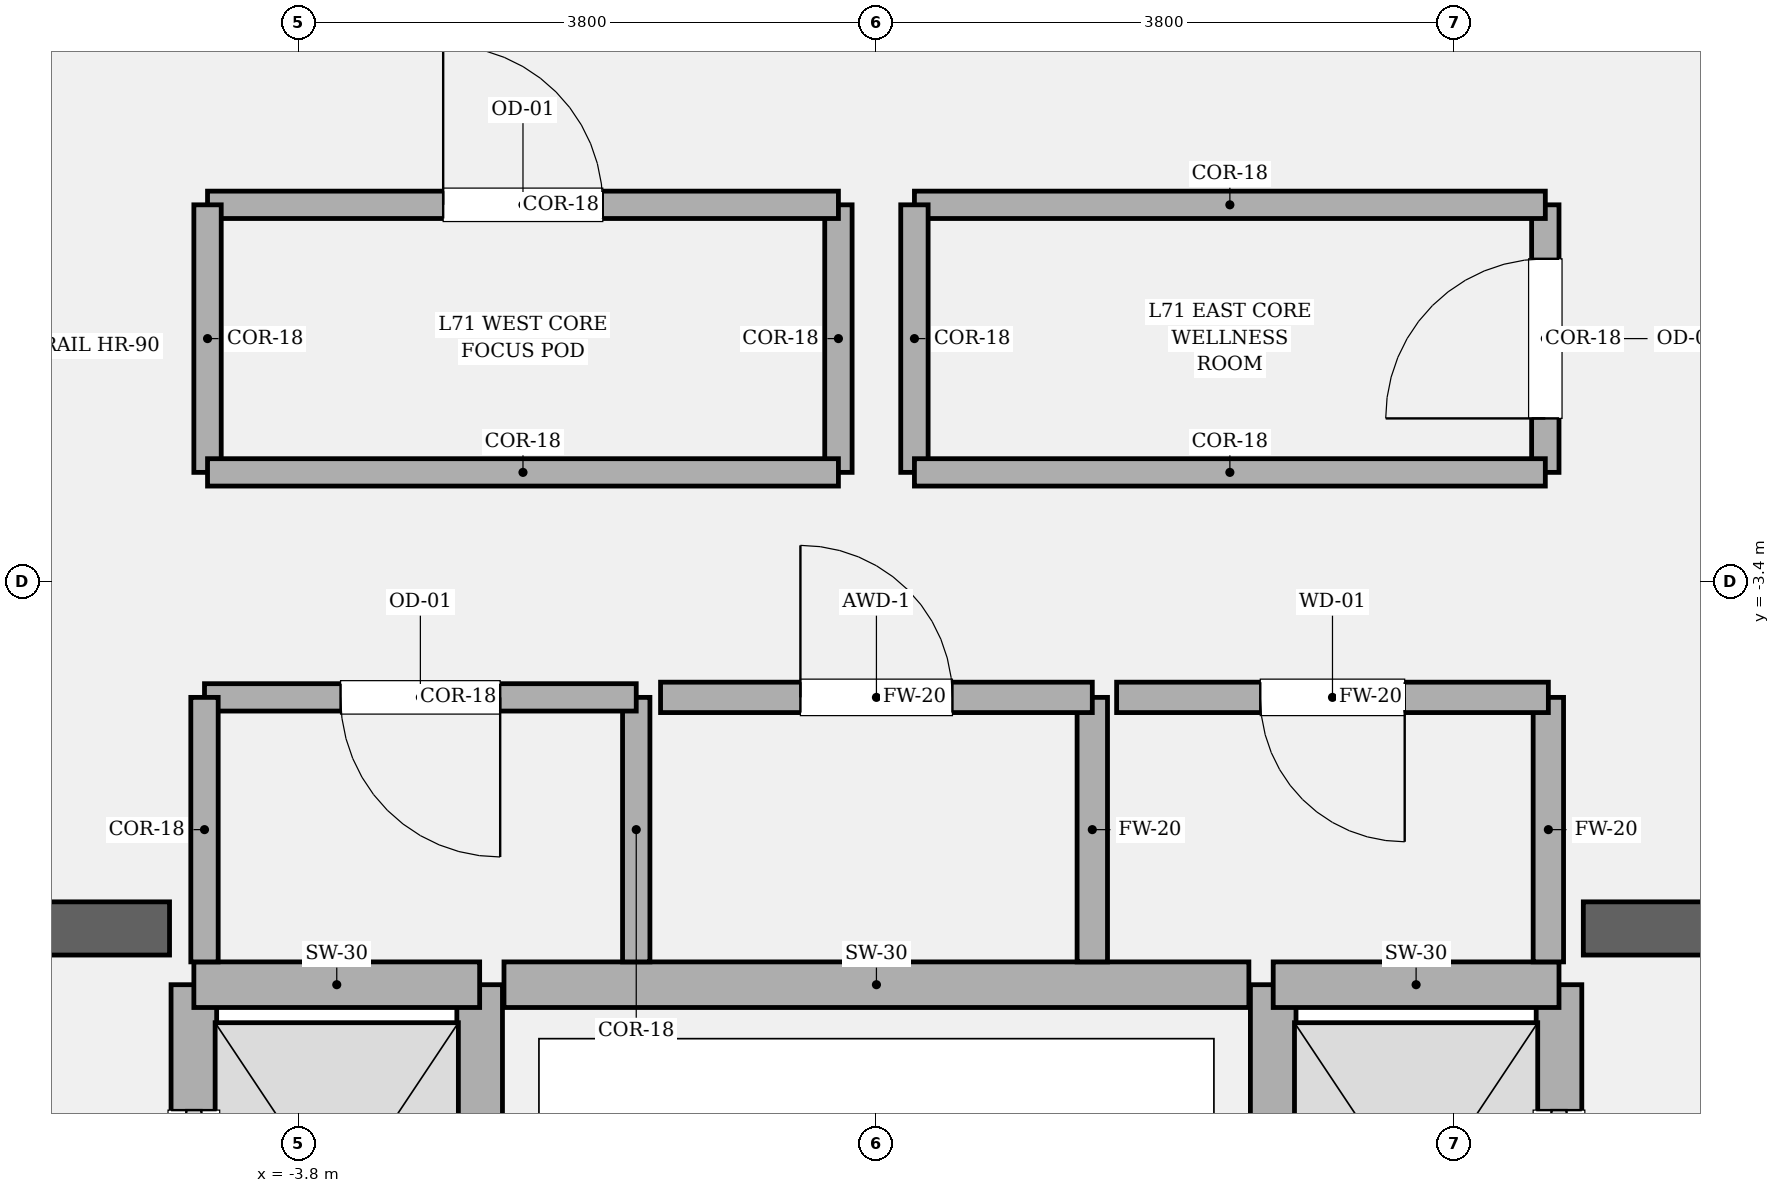
"""IFC4 building model, lengths in metres.
Left out: names, types, materials, properties, quantities, classifications, styles, units other than length and angle.
Written with IfcOpenShell. Run it as: python <this file> out.ifc"""

import sys

from ifc_helpers import new_model, si_unit, direction, frame, frame_2d, origin, place, context, subcontext, project, spatial, rectangle, extrude, element, fill, save


model = new_model("IFC4")
c1 = context("Model", 3, precision=1e-05, world=origin(), true_north=direction((0.0, 1.0)))
c2 = subcontext(c1, "Body", "Model", "MODEL_VIEW")
j1 = project(units=[si_unit("LENGTHUNIT", "METRE"), si_unit("PLANEANGLEUNIT", "RADIAN")], contexts=[c1])
p1 = place(None, origin())
s1 = spatial("IfcSite", under=j1, at=p1, CompositionType="ELEMENT")
p2 = place(p1, origin())
s2 = spatial("IfcBuilding", under=s1, at=p2, CompositionType="ELEMENT")
p3 = place(p2, frame((0.0, 0.0, 300.6)))
s3 = spatial("IfcBuildingStorey", under=s2, at=p3, CompositionType="ELEMENT", Elevation=300.6)
p4 = place(p3, frame((-9.925, -5.68, 0.0), z_axis=(0.0, 0.0, 1.0), x_axis=(1.0, 0.0, 0.0)))
e1 = element("IfcWall", 1, at=p4, inside=s3, PredefinedType="SOLIDWALL", context=c2, shape_type="SweptSolid", body=[
    extrude(rectangle(XDim=5.275, YDim=0.35, at=frame_2d((2.638, 0.0))), origin(), (0.0, 0.0, 1.0), 4.2),
])
p5 = place(p4, frame((1.385, 0.0, 0.0)))
e2 = element("IfcOpeningElement", 2, at=p5, cuts=e1, PredefinedType="OPENING", context=c2, shape_type="SweptSolid", body=[
    extrude(rectangle(XDim=1.18, YDim=2.2, at=frame_2d((0.59, 1.1))), frame((0.0, 0.185, 0.0), z_axis=(0.0, -1.0, 0.0), x_axis=(1.0, 0.0, 0.0)), (0.0, 0.0, 1.0), 0.37),
])
p6 = place(p3, frame((4.65, -5.68, 0.0), z_axis=(0.0, 0.0, 1.0), x_axis=(1.0, 0.0, 0.0)))
e3 = element("IfcWall", 3, at=p6, inside=s3, PredefinedType="SOLIDWALL", context=c2, shape_type="SweptSolid", body=[
    extrude(rectangle(XDim=5.275, YDim=0.35, at=frame_2d((2.638, 0.0))), origin(), (0.0, 0.0, 1.0), 4.2),
])
p7 = place(p6, frame((2.71, 0.0, 0.0)))
e4 = element("IfcOpeningElement", 4, at=p7, cuts=e3, PredefinedType="OPENING", context=c2, shape_type="SweptSolid", body=[
    extrude(rectangle(XDim=1.18, YDim=2.2, at=frame_2d((0.59, 1.1))), frame((0.0, 0.185, 0.0), z_axis=(0.0, -1.0, 0.0), x_axis=(1.0, 0.0, 0.0)), (0.0, 0.0, 1.0), 0.37),
])
p8 = place(p3, frame((-4.49, -8.82, 0.0), z_axis=(0.0, 0.0, 1.0), x_axis=(0.0, 1.0, 0.0)))
e5 = element("IfcWall", 5, at=p8, inside=s3, PredefinedType="SOLIDWALL", context=c2, shape_type="SweptSolid", body=[
    extrude(rectangle(XDim=2.77, YDim=0.3, at=frame_2d((1.385, 0.0))), origin(), (0.0, 0.0, 1.0), 4.0),
])
p9 = place(p8, frame((0.825, 0.0, 0.0)))
e6 = element("IfcOpeningElement", 6, at=p9, cuts=e5, PredefinedType="OPENING", context=c2, shape_type="SweptSolid", body=[
    extrude(rectangle(XDim=1.12, YDim=2.25, at=frame_2d((0.56, 1.125))), frame((0.0, 0.16, 0.0), z_axis=(0.0, -1.0, 0.0), x_axis=(1.0, 0.0, 0.0)), (0.0, 0.0, 1.0), 0.32),
])
p10 = place(p3, frame((-2.61, -8.82, 0.0), z_axis=(0.0, 0.0, 1.0), x_axis=(0.0, 1.0, 0.0)))
e7 = element("IfcWall", 7, at=p10, inside=s3, PredefinedType="SOLIDWALL", context=c2, shape_type="SweptSolid", body=[
    extrude(rectangle(XDim=2.77, YDim=0.3, at=frame_2d((1.385, 0.0))), origin(), (0.0, 0.0, 1.0), 4.0),
])
p11 = place(p3, frame((-4.49, -6.05, 0.0), z_axis=(0.0, 0.0, 1.0), x_axis=(1.0, 0.0, 0.0)))
e8 = element("IfcWall", 8, at=p11, inside=s3, PredefinedType="SOLIDWALL", context=c2, shape_type="SweptSolid", body=[
    extrude(rectangle(XDim=1.88, YDim=0.3, at=frame_2d((0.94, 0.0))), origin(), (0.0, 0.0, 1.0), 4.0),
])
p12 = place(p3, frame((4.49, -8.82, 0.0), z_axis=(0.0, 0.0, 1.0), x_axis=(0.0, 1.0, 0.0)))
e9 = element("IfcWall", 9, at=p12, inside=s3, PredefinedType="SOLIDWALL", context=c2, shape_type="SweptSolid", body=[
    extrude(rectangle(XDim=2.77, YDim=0.3, at=frame_2d((1.385, 0.0))), origin(), (0.0, 0.0, 1.0), 4.0),
])
p13 = place(p12, frame((0.825, 0.0, 0.0)))
e10 = element("IfcOpeningElement", 10, at=p13, cuts=e9, PredefinedType="OPENING", context=c2, shape_type="SweptSolid", body=[
    extrude(rectangle(XDim=1.12, YDim=2.25, at=frame_2d((0.56, 1.125))), frame((0.0, 0.16, 0.0), z_axis=(0.0, -1.0, 0.0), x_axis=(1.0, 0.0, 0.0)), (0.0, 0.0, 1.0), 0.32),
])
p14 = place(p3, frame((2.61, -8.82, 0.0), z_axis=(0.0, 0.0, 1.0), x_axis=(0.0, 1.0, 0.0)))
e11 = element("IfcWall", 11, at=p14, inside=s3, PredefinedType="SOLIDWALL", context=c2, shape_type="SweptSolid", body=[
    extrude(rectangle(XDim=2.77, YDim=0.3, at=frame_2d((1.385, 0.0))), origin(), (0.0, 0.0, 1.0), 4.0),
])
p15 = place(p3, frame((2.61, -6.05, 0.0), z_axis=(0.0, 0.0, 1.0), x_axis=(1.0, 0.0, 0.0)))
e12 = element("IfcWall", 12, at=p15, inside=s3, PredefinedType="SOLIDWALL", context=c2, shape_type="SweptSolid", body=[
    extrude(rectangle(XDim=1.88, YDim=0.3, at=frame_2d((0.94, 0.0))), origin(), (0.0, 0.0, 1.0), 4.0),
])
p16 = place(p3, frame((-2.45, -6.05, 0.0), z_axis=(0.0, 0.0, 1.0), x_axis=(1.0, 0.0, 0.0)))
e13 = element("IfcWall", 13, at=p16, inside=s3, PredefinedType="SOLIDWALL", context=c2, shape_type="SweptSolid", body=[
    extrude(rectangle(XDim=4.9, YDim=0.3, at=frame_2d((2.45, 0.0))), origin(), (0.0, 0.0, 1.0), 4.0),
])
p17 = place(p3, frame((-1.58, -5.9, 0.0), z_axis=(0.0, 0.0, 1.0), x_axis=(0.0, 1.0, 0.0)))
e14 = element("IfcWall", 14, at=p17, inside=s3, PredefinedType="PARTITIONING", context=c2, shape_type="SweptSolid", body=[
    extrude(rectangle(XDim=1.74, YDim=0.18, at=frame_2d((0.87, 0.0))), origin(), (0.0, 0.0, 1.0), 4.0),
])
p18 = place(p3, frame((-1.58, -4.16, 0.0), z_axis=(0.0, 0.0, 1.0), x_axis=(-1.0, 0.0, 0.0)))
e15 = element("IfcWall", 15, at=p18, inside=s3, PredefinedType="PARTITIONING", context=c2, shape_type="SweptSolid", body=[
    extrude(rectangle(XDim=2.84, YDim=0.18, at=frame_2d((1.42, 0.0))), origin(), (0.0, 0.0, 1.0), 4.0),
])
p19 = place(p18, frame((0.895, 0.0, 0.0)))
e16 = element("IfcOpeningElement", 16, at=p19, cuts=e15, PredefinedType="OPENING", context=c2, shape_type="SweptSolid", body=[
    extrude(rectangle(XDim=1.05, YDim=2.2, at=frame_2d((0.525, 1.1))), frame((0.0, 0.1, 0.0), z_axis=(0.0, -1.0, 0.0), x_axis=(1.0, 0.0, 0.0)), (0.0, 0.0, 1.0), 0.2),
])
p20 = place(p3, frame((-4.42, -4.16, 0.0), z_axis=(0.0, 0.0, 1.0), x_axis=(0.0, -1.0, 0.0)))
e17 = element("IfcWall", 17, at=p20, inside=s3, PredefinedType="PARTITIONING", context=c2, shape_type="SweptSolid", body=[
    extrude(rectangle(XDim=1.74, YDim=0.18, at=frame_2d((0.87, 0.0))), origin(), (0.0, 0.0, 1.0), 4.0),
])
p21 = place(p3, frame((1.42, -5.9, 0.0), z_axis=(0.0, 0.0, 1.0), x_axis=(0.0, 1.0, 0.0)))
e18 = element("IfcWall", 18, at=p21, inside=s3, PredefinedType="SOLIDWALL", context=c2, shape_type="SweptSolid", body=[
    extrude(rectangle(XDim=1.74, YDim=0.2, at=frame_2d((0.87, 0.0))), origin(), (0.0, 0.0, 1.0), 4.0),
])
p22 = place(p3, frame((1.42, -4.16, 0.0), z_axis=(0.0, 0.0, 1.0), x_axis=(-1.0, 0.0, 0.0)))
e19 = element("IfcWall", 19, at=p22, inside=s3, PredefinedType="SOLIDWALL", context=c2, shape_type="SweptSolid", body=[
    extrude(rectangle(XDim=2.84, YDim=0.2, at=frame_2d((1.42, 0.0))), origin(), (0.0, 0.0, 1.0), 4.0),
])
p23 = place(p22, frame((0.92, 0.0, 0.0)))
e20 = element("IfcOpeningElement", 20, at=p23, cuts=e19, PredefinedType="OPENING", context=c2, shape_type="SweptSolid", body=[
    extrude(rectangle(XDim=1.0, YDim=2.15, at=frame_2d((0.5, 1.075))), frame((0.0, 0.11, 0.0), z_axis=(0.0, -1.0, 0.0), x_axis=(1.0, 0.0, 0.0)), (0.0, 0.0, 1.0), 0.22),
])
p24 = place(p3, frame((4.42, -5.9, 0.0), z_axis=(0.0, 0.0, 1.0), x_axis=(0.0, 1.0, 0.0)))
e21 = element("IfcWall", 21, at=p24, inside=s3, PredefinedType="SOLIDWALL", context=c2, shape_type="SweptSolid", body=[
    extrude(rectangle(XDim=1.74, YDim=0.2, at=frame_2d((0.87, 0.0))), origin(), (0.0, 0.0, 1.0), 4.0),
])
p25 = place(p3, frame((4.42, -4.16, 0.0), z_axis=(0.0, 0.0, 1.0), x_axis=(-1.0, 0.0, 0.0)))
e22 = element("IfcWall", 22, at=p25, inside=s3, PredefinedType="SOLIDWALL", context=c2, shape_type="SweptSolid", body=[
    extrude(rectangle(XDim=2.84, YDim=0.2, at=frame_2d((1.42, 0.0))), origin(), (0.0, 0.0, 1.0), 4.0),
])
p26 = place(p25, frame((0.945, 0.0, 0.0)))
e23 = element("IfcOpeningElement", 23, at=p26, cuts=e22, PredefinedType="OPENING", context=c2, shape_type="SweptSolid", body=[
    extrude(rectangle(XDim=0.95, YDim=2.15, at=frame_2d((0.475, 1.075))), frame((0.0, 0.11, 0.0), z_axis=(0.0, -1.0, 0.0), x_axis=(1.0, 0.0, 0.0)), (0.0, 0.0, 1.0), 0.22),
])
p27 = place(p3, frame((-0.25, -2.68, 0.0), z_axis=(0.0, 0.0, 1.0), x_axis=(0.0, 1.0, 0.0)))
e24 = element("IfcWall", 24, at=p27, inside=s3, PredefinedType="PARTITIONING", context=c2, shape_type="SweptSolid", body=[
    extrude(rectangle(XDim=1.76, YDim=0.18, at=frame_2d((0.88, 0.0))), origin(), (0.0, 0.0, 1.0), 4.0),
])
p28 = place(p3, frame((-0.25, -0.92, 0.0), z_axis=(0.0, 0.0, 1.0), x_axis=(-1.0, 0.0, 0.0)))
e25 = element("IfcWall", 25, at=p28, inside=s3, PredefinedType="PARTITIONING", context=c2, shape_type="SweptSolid", body=[
    extrude(rectangle(XDim=4.15, YDim=0.18, at=frame_2d((2.075, 0.0))), origin(), (0.0, 0.0, 1.0), 4.0),
])
p29 = place(p28, frame((1.55, 0.0, 0.0)))
e26 = element("IfcOpeningElement", 26, at=p29, cuts=e25, PredefinedType="OPENING", context=c2, shape_type="SweptSolid", body=[
    extrude(rectangle(XDim=1.05, YDim=2.2, at=frame_2d((0.525, 1.1))), frame((0.0, 0.1, 0.0), z_axis=(0.0, -1.0, 0.0), x_axis=(1.0, 0.0, 0.0)), (0.0, 0.0, 1.0), 0.2),
])
p30 = place(p3, frame((-4.4, -0.92, 0.0), z_axis=(0.0, 0.0, 1.0), x_axis=(0.0, -1.0, 0.0)))
e27 = element("IfcWall", 27, at=p30, inside=s3, PredefinedType="PARTITIONING", context=c2, shape_type="SweptSolid", body=[
    extrude(rectangle(XDim=1.76, YDim=0.18, at=frame_2d((0.88, 0.0))), origin(), (0.0, 0.0, 1.0), 4.0),
])
p31 = place(p3, frame((-4.4, -2.68, 0.0), z_axis=(0.0, 0.0, 1.0), x_axis=(1.0, 0.0, 0.0)))
e28 = element("IfcWall", 28, at=p31, inside=s3, PredefinedType="PARTITIONING", context=c2, shape_type="SweptSolid", body=[
    extrude(rectangle(XDim=4.15, YDim=0.18, at=frame_2d((2.075, 0.0))), origin(), (0.0, 0.0, 1.0), 4.0),
])
p32 = place(p3, frame((4.4, -2.68, 0.0), z_axis=(0.0, 0.0, 1.0), x_axis=(0.0, 1.0, 0.0)))
e29 = element("IfcWall", 29, at=p32, inside=s3, PredefinedType="PARTITIONING", context=c2, shape_type="SweptSolid", body=[
    extrude(rectangle(XDim=1.76, YDim=0.18, at=frame_2d((0.88, 0.0))), origin(), (0.0, 0.0, 1.0), 4.0),
])
p33 = place(p32, frame((0.355, 0.0, 0.0)))
e30 = element("IfcOpeningElement", 30, at=p33, cuts=e29, PredefinedType="OPENING", context=c2, shape_type="SweptSolid", body=[
    extrude(rectangle(XDim=1.05, YDim=2.2, at=frame_2d((0.525, 1.1))), frame((0.0, 0.1, 0.0), z_axis=(0.0, -1.0, 0.0), x_axis=(1.0, 0.0, 0.0)), (0.0, 0.0, 1.0), 0.2),
])
p34 = place(p3, frame((4.4, -0.92, 0.0), z_axis=(0.0, 0.0, 1.0), x_axis=(-1.0, 0.0, 0.0)))
e31 = element("IfcWall", 31, at=p34, inside=s3, PredefinedType="PARTITIONING", context=c2, shape_type="SweptSolid", body=[
    extrude(rectangle(XDim=4.15, YDim=0.18, at=frame_2d((2.075, 0.0))), origin(), (0.0, 0.0, 1.0), 4.0),
])
p35 = place(p3, frame((0.25, -0.92, 0.0), z_axis=(0.0, 0.0, 1.0), x_axis=(0.0, -1.0, 0.0)))
e32 = element("IfcWall", 32, at=p35, inside=s3, PredefinedType="PARTITIONING", context=c2, shape_type="SweptSolid", body=[
    extrude(rectangle(XDim=1.76, YDim=0.18, at=frame_2d((0.88, 0.0))), origin(), (0.0, 0.0, 1.0), 4.0),
])
p36 = place(p3, frame((0.25, -2.68, 0.0), z_axis=(0.0, 0.0, 1.0), x_axis=(1.0, 0.0, 0.0)))
e33 = element("IfcWall", 33, at=p36, inside=s3, PredefinedType="PARTITIONING", context=c2, shape_type="SweptSolid", body=[
    extrude(rectangle(XDim=4.15, YDim=0.18, at=frame_2d((2.075, 0.0))), origin(), (0.0, 0.0, 1.0), 4.0),
])
p37 = place(p9, origin())
e34 = element("IfcDoor", 34, at=p37, inside=s3, OperationType="SLIDING_TO_LEFT", PredefinedType="DOOR", context=c2, shape_type="SweptSolid", body=[
    extrude(rectangle(XDim=1.12, YDim=2.25, at=frame_2d((0.56, 1.125))), frame((0.0, 0.025, 0.0), z_axis=(0.0, -1.0, 0.0), x_axis=(1.0, 0.0, 0.0)), (0.0, 0.0, 1.0), 0.05),
])
fill(e6, e34)
p38 = place(p13, origin())
e35 = element("IfcDoor", 35, at=p38, inside=s3, OperationType="SLIDING_TO_RIGHT", PredefinedType="DOOR", context=c2, shape_type="SweptSolid", body=[
    extrude(rectangle(XDim=1.12, YDim=2.25, at=frame_2d((0.56, 1.125))), frame((0.0, 0.025, 0.0), z_axis=(0.0, -1.0, 0.0), x_axis=(1.0, 0.0, 0.0)), (0.0, 0.0, 1.0), 0.05),
])
fill(e10, e35)
p39 = place(p19, origin())
e36 = element("IfcDoor", 36, at=p39, inside=s3, OperationType="SINGLE_SWING_LEFT", PredefinedType="DOOR", context=c2, shape_type="SweptSolid", body=[
    extrude(rectangle(XDim=1.05, YDim=2.2, at=frame_2d((0.525, 1.1))), frame((0.0, 0.025, 0.0), z_axis=(0.0, -1.0, 0.0), x_axis=(1.0, 0.0, 0.0)), (0.0, 0.0, 1.0), 0.05),
])
fill(e16, e36)
p40 = place(p23, origin())
e37 = element("IfcDoor", 37, at=p40, inside=s3, OperationType="SINGLE_SWING_RIGHT", PredefinedType="DOOR", context=c2, shape_type="SweptSolid", body=[
    extrude(rectangle(XDim=1.0, YDim=2.15, at=frame_2d((0.5, 1.075))), frame((0.0, 0.025, 0.0), z_axis=(0.0, -1.0, 0.0), x_axis=(1.0, 0.0, 0.0)), (0.0, 0.0, 1.0), 0.05),
])
fill(e20, e37)
p41 = place(p26, origin())
e38 = element("IfcDoor", 38, at=p41, inside=s3, OperationType="SINGLE_SWING_LEFT", PredefinedType="DOOR", context=c2, shape_type="SweptSolid", body=[
    extrude(rectangle(XDim=0.95, YDim=2.15, at=frame_2d((0.475, 1.075))), frame((0.0, 0.025, 0.0), z_axis=(0.0, -1.0, 0.0), x_axis=(1.0, 0.0, 0.0)), (0.0, 0.0, 1.0), 0.05),
])
fill(e23, e38)
p42 = place(p29, origin())
e39 = element("IfcDoor", 39, at=p42, inside=s3, OperationType="SINGLE_SWING_RIGHT", PredefinedType="DOOR", context=c2, shape_type="SweptSolid", body=[
    extrude(rectangle(XDim=1.05, YDim=2.2, at=frame_2d((0.525, 1.1))), frame((0.0, 0.025, 0.0), z_axis=(0.0, -1.0, 0.0), x_axis=(1.0, 0.0, 0.0)), (0.0, 0.0, 1.0), 0.05),
])
fill(e26, e39)
p43 = place(p33, origin())
e40 = element("IfcDoor", 40, at=p43, inside=s3, OperationType="SINGLE_SWING_LEFT", PredefinedType="DOOR", context=c2, shape_type="SweptSolid", body=[
    extrude(rectangle(XDim=1.05, YDim=2.2, at=frame_2d((0.525, 1.1))), frame((0.0, 0.025, 0.0), z_axis=(0.0, -1.0, 0.0), x_axis=(1.0, 0.0, 0.0)), (0.0, 0.0, 1.0), 0.05),
])
fill(e30, e40)
save(model, sys.argv[1])
